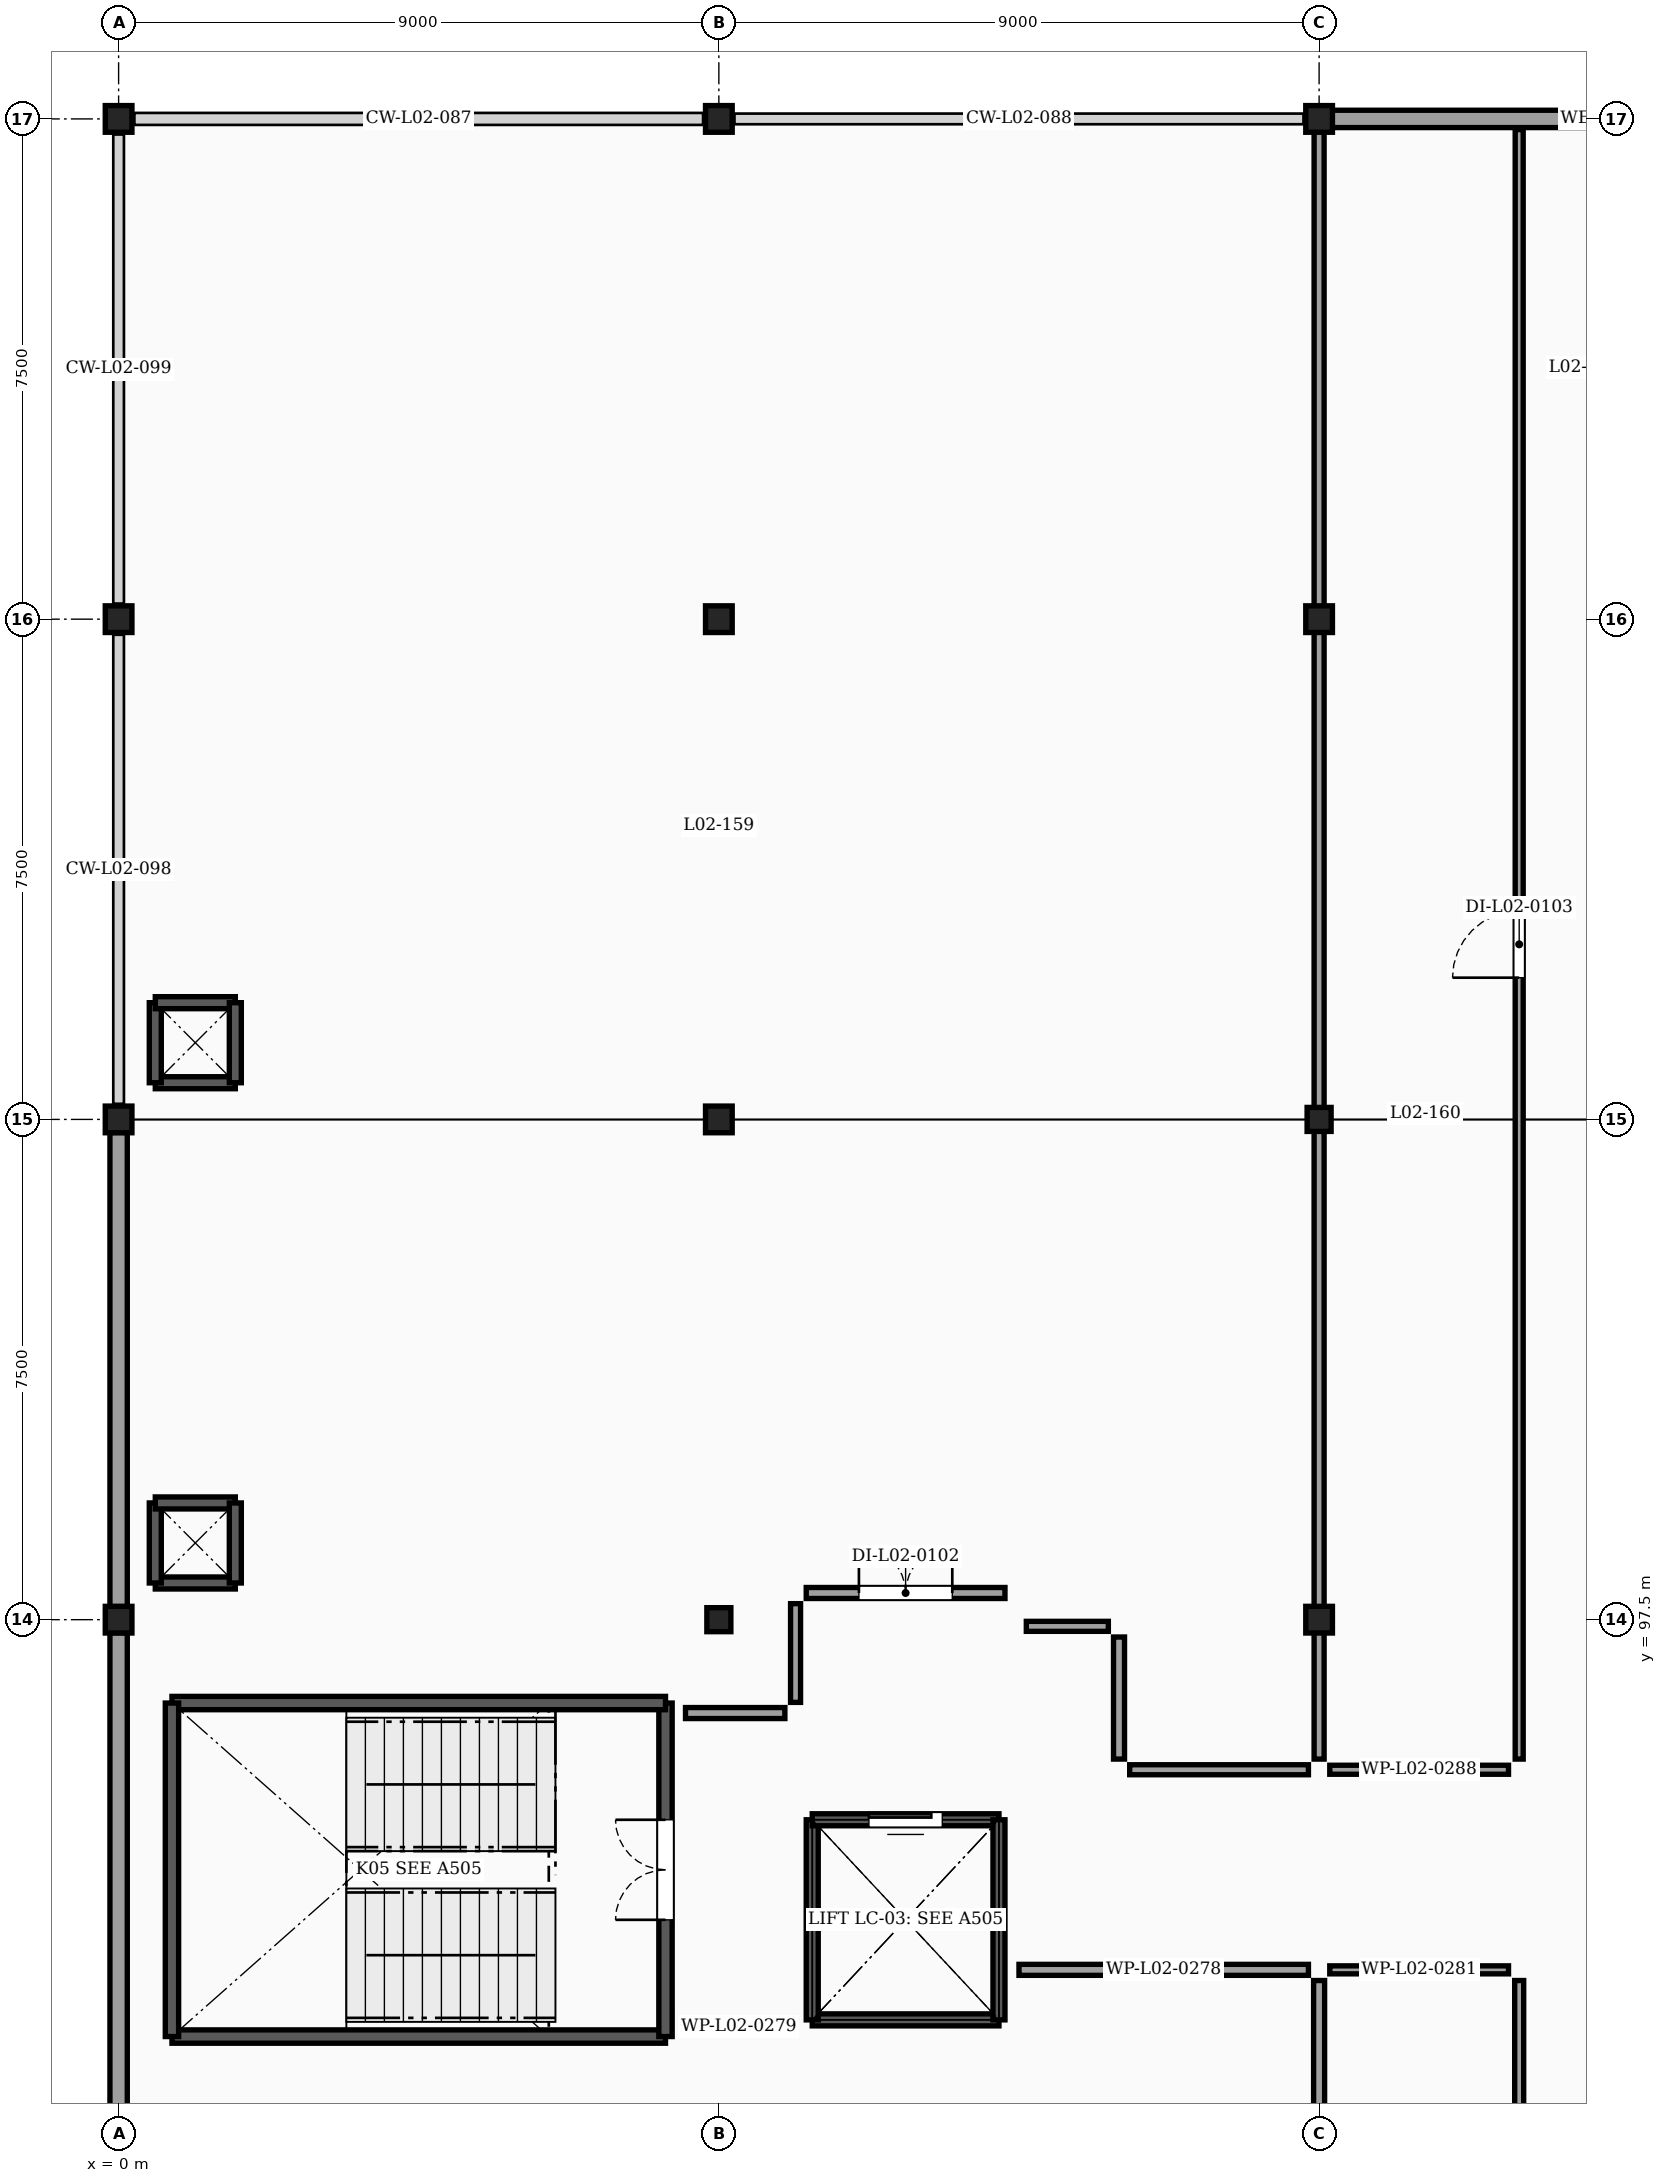
"""IFC4 building model, lengths in metres.
Left out: names, types, materials, properties, quantities, classifications, styles, units other than length and angle.
Written with IfcOpenShell. Run it as: python <this file> out.ifc"""

import sys

from ifc_helpers import new_model, si_unit, direction, frame, frame_2d, origin, origin_2d, place, context, subcontext, project, spatial, rectangle, extrude, element, fill, save


model = new_model("IFC4")
c1 = context("Model", 3, precision=1e-05, world=origin(), true_north=direction((0.0, 1.0)))
c2 = subcontext(c1, "Body", "Model", "MODEL_VIEW")
j1 = project(units=[si_unit("LENGTHUNIT", "METRE"), si_unit("PLANEANGLEUNIT", "RADIAN")], contexts=[c1])
p1 = place(None, origin())
s1 = spatial("IfcSite", under=j1, at=p1, CompositionType="ELEMENT")
p2 = place(p1, origin())
s2 = spatial("IfcBuilding", under=s1, at=p2, CompositionType="ELEMENT")
p3 = place(p2, frame((0.0, 0.0, 8.5)))
s3 = spatial("IfcBuildingStorey", under=s2, at=p3, CompositionType="ELEMENT", Elevation=8.5)
p4 = place(p3, frame((0.0, 97.5, 0.0), z_axis=(0.0, 0.0, 1.0), x_axis=(1.0, 0.0, 0.0)))
e1 = element("IfcColumn", 1, at=p4, inside=s3, PredefinedType="COLUMN", context=c2, shape_type="SweptSolid", body=[
    extrude(rectangle(XDim=0.4, YDim=0.4, at=origin_2d()), origin(), (0.0, 0.0, 1.0), 3.8),
])
p5 = place(p3, frame((9.0, 97.5, 0.0), z_axis=(0.0, 0.0, 1.0), x_axis=(1.0, 0.0, 0.0)))
e2 = element("IfcColumn", 2, at=p5, inside=s3, PredefinedType="COLUMN", context=c2, shape_type="SweptSolid", body=[
    extrude(rectangle(XDim=0.36, YDim=0.36, at=origin_2d()), origin(), (0.0, 0.0, 1.0), 3.8),
])
for number, where, z_axis, x_axis in (
    (3, (18.0, 97.5, 0.0), (0.0, 0.0, 1.0), (1.0, 0.0, 0.0)),
    (4, (0.0, 105.0, 0.0), (0.0, 0.0, 1.0), (1.0, 0.0, 0.0)),
    (5, (9.0, 105.0, 0.0), (0.0, 0.0, 1.0), (1.0, 0.0, 0.0)),
):
    element("IfcColumn", number, at=place(p3, frame(where, z_axis=z_axis, x_axis=x_axis)), inside=s3, PredefinedType="COLUMN", context=c2, shape_type="SweptSolid", body=[
        extrude(rectangle(XDim=0.4, YDim=0.4, at=origin_2d()), origin(), (0.0, 0.0, 1.0), 3.8),
    ])
p6 = place(p3, frame((18.0, 105.0, 0.0), z_axis=(0.0, 0.0, 1.0), x_axis=(1.0, 0.0, 0.0)))
e6 = element("IfcColumn", 6, at=p6, inside=s3, PredefinedType="COLUMN", context=c2, shape_type="SweptSolid", body=[
    extrude(rectangle(XDim=0.36, YDim=0.36, at=origin_2d()), origin(), (0.0, 0.0, 1.0), 3.8),
])
for number, where, z_axis, x_axis in (
    (7, (0.0, 112.5, 0.0), (0.0, 0.0, 1.0), (1.0, 0.0, 0.0)),
    (8, (9.0, 112.5, 0.0), (0.0, 0.0, 1.0), (1.0, 0.0, 0.0)),
    (9, (18.0, 112.5, 0.0), (0.0, 0.0, 1.0), (1.0, 0.0, 0.0)),
    (10, (0.0, 120.0, 0.0), (0.0, 0.0, 1.0), (1.0, 0.0, 0.0)),
    (11, (9.0, 120.0, 0.0), (0.0, 0.0, 1.0), (1.0, 0.0, 0.0)),
    (12, (18.0, 120.0, 0.0), (0.0, 0.0, 1.0), (1.0, 0.0, 0.0)),
):
    element("IfcColumn", number, at=place(p3, frame(where, z_axis=z_axis, x_axis=x_axis)), inside=s3, PredefinedType="COLUMN", context=c2, shape_type="SweptSolid", body=[
        extrude(rectangle(XDim=0.4, YDim=0.4, at=origin_2d()), origin(), (0.0, 0.0, 1.0), 3.8),
    ])
p7 = place(p3, frame((18.196, 120.0, 0.0), z_axis=(0.0, 0.0, 1.0), x_axis=(1.0, 0.0, 0.0)))
e13 = element("IfcWall", 13, at=p7, inside=s3, PredefinedType="SOLIDWALL", context=c2, shape_type="SweptSolid", body=[
    extrude(rectangle(XDim=8.608, YDim=0.26, at=frame_2d((4.304, 0.0))), origin(), (0.0, 0.0, 1.0), 2.987),
])
for number, where, z_axis, x_axis in (
    (14, (0.0, 90.196, 0.0), (0.0, 0.0, 1.0), (0.0, 1.0, 0.0)),
    (15, (0.0, 97.696, 0.0), (0.0, 0.0, 1.0), (0.0, 1.0, 0.0)),
):
    element("IfcWall", number, at=place(p3, frame(where, z_axis=z_axis, x_axis=x_axis)), inside=s3, PredefinedType="SOLIDWALL", context=c2, shape_type="SweptSolid", body=[
        extrude(rectangle(XDim=7.108, YDim=0.26, at=frame_2d((3.554, 0.0))), origin(), (0.0, 0.0, 1.0), 2.987),
    ])
for number, where, z_axis, x_axis in (
    (16, (1.75, 98.05, 0.0), (0.0, 0.0, 1.0), (-1.0, 0.0, 0.0)),
    (17, (0.55, 98.05, 0.0), (0.0, 0.0, 1.0), (0.0, 1.0, 0.0)),
    (18, (0.55, 99.25, 0.0), (0.0, 0.0, 1.0), (1.0, 0.0, 0.0)),
    (19, (1.75, 99.25, 0.0), (0.0, 0.0, 1.0), (0.0, -1.0, 0.0)),
    (20, (1.75, 105.55, 0.0), (0.0, 0.0, 1.0), (-1.0, 0.0, 0.0)),
    (21, (0.55, 105.55, 0.0), (0.0, 0.0, 1.0), (0.0, 1.0, 0.0)),
    (22, (0.55, 106.75, 0.0), (0.0, 0.0, 1.0), (1.0, 0.0, 0.0)),
    (23, (1.75, 106.75, 0.0), (0.0, 0.0, 1.0), (0.0, -1.0, 0.0)),
):
    element("IfcWall", number, at=place(p3, frame(where, z_axis=z_axis, x_axis=x_axis)), inside=s3, PredefinedType="SHEAR", context=c2, shape_type="SweptSolid", body=[
        extrude(rectangle(XDim=1.2, YDim=0.18, at=frame_2d((0.6, 0.0))), origin(), (0.0, 0.0, 1.0), 3.58),
    ])
p8 = place(p3, frame((0.8, 91.25, 0.0), z_axis=(0.0, 0.0, 1.0), x_axis=(1.0, 0.0, 0.0)))
e24 = element("IfcWall", 24, at=p8, inside=s3, PredefinedType="SHEAR", context=c2, shape_type="SweptSolid", body=[
    extrude(rectangle(XDim=7.4, YDim=0.2, at=frame_2d((3.7, 0.0))), origin(), (0.0, 0.0, 1.0), 3.58),
])
p9 = place(p3, frame((8.2, 91.25, 0.0), z_axis=(0.0, 0.0, 1.0), x_axis=(0.0, 1.0, 0.0)))
e25 = element("IfcWall", 25, at=p9, inside=s3, PredefinedType="SHEAR", context=c2, shape_type="SweptSolid", body=[
    extrude(rectangle(XDim=5.0, YDim=0.2, at=frame_2d((2.5, 0.0))), origin(), (0.0, 0.0, 1.0), 3.58),
])
p10 = place(p9, frame((1.75, 0.0, 0.0)))
e26 = element("IfcOpeningElement", 26, at=p10, cuts=e25, PredefinedType="OPENING", context=c2, shape_type="SweptSolid", body=[
    extrude(rectangle(XDim=1.5, YDim=2.15, at=frame_2d((0.75, 1.075))), frame((0.0, 0.11, 0.0), z_axis=(0.0, -1.0, 0.0), x_axis=(1.0, 0.0, 0.0)), (0.0, 0.0, 1.0), 0.22),
])
p11 = place(p3, frame((8.2, 96.25, 0.0), z_axis=(0.0, 0.0, 1.0), x_axis=(-1.0, 0.0, 0.0)))
e27 = element("IfcWall", 27, at=p11, inside=s3, PredefinedType="SHEAR", context=c2, shape_type="SweptSolid", body=[
    extrude(rectangle(XDim=7.4, YDim=0.2, at=frame_2d((3.7, 0.0))), origin(), (0.0, 0.0, 1.0), 3.58),
])
p12 = place(p3, frame((0.8, 96.25, 0.0), z_axis=(0.0, 0.0, 1.0), x_axis=(0.0, -1.0, 0.0)))
e28 = element("IfcWall", 28, at=p12, inside=s3, PredefinedType="SHEAR", context=c2, shape_type="SweptSolid", body=[
    extrude(rectangle(XDim=5.0, YDim=0.2, at=frame_2d((2.5, 0.0))), origin(), (0.0, 0.0, 1.0), 3.58),
])
p13 = place(p3, frame((13.2, 91.5, 0.0), z_axis=(0.0, 0.0, 1.0), x_axis=(-1.0, 0.0, 0.0)))
e29 = element("IfcWall", 29, at=p13, inside=s3, PredefinedType="SHEAR", context=c2, shape_type="SweptSolid", body=[
    extrude(rectangle(XDim=2.8, YDim=0.18, at=frame_2d((1.4, 0.0))), origin(), (0.0, 0.0, 1.0), 3.58),
])
p14 = place(p3, frame((10.4, 91.5, 0.0), z_axis=(0.0, 0.0, 1.0), x_axis=(0.0, 1.0, 0.0)))
e30 = element("IfcWall", 30, at=p14, inside=s3, PredefinedType="SHEAR", context=c2, shape_type="SweptSolid", body=[
    extrude(rectangle(XDim=3.0, YDim=0.18, at=frame_2d((1.5, 0.0))), origin(), (0.0, 0.0, 1.0), 3.58),
])
p15 = place(p3, frame((10.4, 94.5, 0.0), z_axis=(0.0, 0.0, 1.0), x_axis=(1.0, 0.0, 0.0)))
e31 = element("IfcWall", 31, at=p15, inside=s3, PredefinedType="SHEAR", context=c2, shape_type="SweptSolid", body=[
    extrude(rectangle(XDim=2.8, YDim=0.18, at=frame_2d((1.4, 0.0))), origin(), (0.0, 0.0, 1.0), 3.58),
])
p16 = place(p15, frame((0.85, 0.0, 0.0)))
e32 = element("IfcOpeningElement", 32, at=p16, cuts=e31, PredefinedType="OPENING", context=c2, shape_type="SweptSolid", body=[
    extrude(rectangle(XDim=1.1, YDim=2.15, at=frame_2d((0.55, 1.075))), frame((0.0, 0.1, 0.0), z_axis=(0.0, -1.0, 0.0), x_axis=(1.0, 0.0, 0.0)), (0.0, 0.0, 1.0), 0.2),
])
p17 = place(p3, frame((13.2, 94.5, 0.0), z_axis=(0.0, 0.0, 1.0), x_axis=(0.0, -1.0, 0.0)))
e33 = element("IfcWall", 33, at=p17, inside=s3, PredefinedType="SHEAR", context=c2, shape_type="SweptSolid", body=[
    extrude(rectangle(XDim=3.0, YDim=0.18, at=frame_2d((1.5, 0.0))), origin(), (0.0, 0.0, 1.0), 3.58),
])
p18 = place(p3, frame((17.84, 92.25, 0.0), z_axis=(0.0, 0.0, 1.0), x_axis=(-1.0, 0.0, 0.0)))
e34 = element("IfcWall", 34, at=p18, inside=s3, PredefinedType="PARTITIONING", context=c2, shape_type="SweptSolid", body=[
    extrude(rectangle(XDim=4.34, YDim=0.165, at=frame_2d((2.17, 0.0))), origin(), (0.0, 0.0, 1.0), 3.58),
])
p19 = place(p3, frame((10.1, 91.4, 0.0), z_axis=(0.0, 0.0, 1.0), x_axis=(-1.0, 0.0, 0.0)))
e35 = element("IfcWall", 35, at=p19, inside=s3, PredefinedType="PARTITIONING", context=c2, shape_type="SweptSolid", body=[
    extrude(rectangle(XDim=1.6, YDim=0.15, at=frame_2d((0.8, 0.0))), origin(), (0.0, 0.0, 1.0), 3.58),
])
p20 = place(p3, frame((21.0, 82.66, 0.0), z_axis=(0.0, 0.0, 1.0), x_axis=(0.0, 1.0, 0.0)))
e36 = element("IfcWall", 36, at=p20, inside=s3, PredefinedType="PARTITIONING", context=c2, shape_type="SweptSolid", body=[
    extrude(rectangle(XDim=9.43, YDim=0.135, at=frame_2d((4.715, 0.0))), origin(), (0.0, 0.0, 1.0), 3.172),
])
p21 = place(p20, frame((4.215, 0.0, 0.0)))
e37 = element("IfcOpeningElement", 37, at=p21, cuts=e36, PredefinedType="OPENING", context=c2, shape_type="SweptSolid", body=[
    extrude(rectangle(XDim=1.0, YDim=2.15, at=frame_2d((0.5, 1.075))), frame((0.0, 0.077, 0.0), z_axis=(0.0, -1.0, 0.0), x_axis=(1.0, 0.0, 0.0)), (0.0, 0.0, 1.0), 0.155),
])
p22 = place(p3, frame((20.84, 92.25, 0.0), z_axis=(0.0, 0.0, 1.0), x_axis=(-1.0, 0.0, 0.0)))
e38 = element("IfcWall", 38, at=p22, inside=s3, PredefinedType="PARTITIONING", context=c2, shape_type="SweptSolid", body=[
    extrude(rectangle(XDim=2.68, YDim=0.12, at=frame_2d((1.34, 0.0))), origin(), (0.0, 0.0, 1.0), 3.58),
])
p23 = place(p3, frame((15.0, 97.24, 0.0), z_axis=(0.0, 0.0, 1.0), x_axis=(0.0, -1.0, 0.0)))
e39 = element("IfcWall", 39, at=p23, inside=s3, PredefinedType="PARTITIONING", context=c2, shape_type="SweptSolid", body=[
    extrude(rectangle(XDim=1.83, YDim=0.165, at=frame_2d((0.915, 0.0))), origin(), (0.0, 0.0, 1.0), 3.172),
])
p24 = place(p3, frame((15.16, 95.25, 0.0), z_axis=(0.0, 0.0, 1.0), x_axis=(1.0, 0.0, 0.0)))
e40 = element("IfcWall", 40, at=p24, inside=s3, PredefinedType="PARTITIONING", context=c2, shape_type="SweptSolid", body=[
    extrude(rectangle(XDim=2.68, YDim=0.15, at=frame_2d((1.34, 0.0))), origin(), (0.0, 0.0, 1.0), 3.58),
])
p25 = place(p3, frame((8.5, 96.1, 0.0), z_axis=(0.0, 0.0, 1.0), x_axis=(1.0, 0.0, 0.0)))
e41 = element("IfcWall", 41, at=p25, inside=s3, PredefinedType="PARTITIONING", context=c2, shape_type="SweptSolid", body=[
    extrude(rectangle(XDim=1.49, YDim=0.165, at=frame_2d((0.745, 0.0))), origin(), (0.0, 0.0, 1.0), 3.58),
])
p26 = place(p3, frame((10.15, 96.26, 0.0), z_axis=(0.0, 0.0, 1.0), x_axis=(0.0, 1.0, 0.0)))
e42 = element("IfcWall", 42, at=p26, inside=s3, PredefinedType="PARTITIONING", context=c2, shape_type="SweptSolid", body=[
    extrude(rectangle(XDim=1.48, YDim=0.15, at=frame_2d((0.74, 0.0))), origin(), (0.0, 0.0, 1.0), 3.58),
])
p27 = place(p3, frame((10.31, 97.9, 0.0), z_axis=(0.0, 0.0, 1.0), x_axis=(1.0, 0.0, 0.0)))
e43 = element("IfcWall", 43, at=p27, inside=s3, PredefinedType="PARTITIONING", context=c2, shape_type="SweptSolid", body=[
    extrude(rectangle(XDim=2.98, YDim=0.165, at=frame_2d((1.49, 0.0))), origin(), (0.0, 0.0, 1.0), 3.58),
])
p28 = place(p27, frame((0.79, 0.0, 0.0)))
e44 = element("IfcOpeningElement", 44, at=p28, cuts=e43, PredefinedType="OPENING", context=c2, shape_type="SweptSolid", body=[
    extrude(rectangle(XDim=1.4, YDim=2.15, at=frame_2d((0.7, 1.075))), frame((0.0, 0.093, 0.0), z_axis=(0.0, -1.0, 0.0), x_axis=(1.0, 0.0, 0.0)), (0.0, 0.0, 1.0), 0.185),
])
p29 = place(p3, frame((13.61, 97.4, 0.0), z_axis=(0.0, 0.0, 1.0), x_axis=(1.0, 0.0, 0.0)))
e45 = element("IfcWall", 45, at=p29, inside=s3, PredefinedType="PARTITIONING", context=c2, shape_type="SweptSolid", body=[
    extrude(rectangle(XDim=1.23, YDim=0.15, at=frame_2d((0.615, 0.0))), origin(), (0.0, 0.0, 1.0), 2.88),
])
p30 = place(p3, frame((18.16, 95.25, 0.0), z_axis=(0.0, 0.0, 1.0), x_axis=(1.0, 0.0, 0.0)))
e46 = element("IfcWall", 46, at=p30, inside=s3, PredefinedType="PARTITIONING", context=c2, shape_type="SweptSolid", body=[
    extrude(rectangle(XDim=2.68, YDim=0.135, at=frame_2d((1.34, 0.0))), origin(), (0.0, 0.0, 1.0), 3.58),
])
p31 = place(p3, frame((21.0, 95.41, 0.0), z_axis=(0.0, 0.0, 1.0), x_axis=(0.0, 1.0, 0.0)))
e47 = element("IfcWall", 47, at=p31, inside=s3, PredefinedType="PARTITIONING", context=c2, shape_type="SweptSolid", body=[
    extrude(rectangle(XDim=24.43, YDim=0.12, at=frame_2d((12.215, 0.0))), origin(), (0.0, 0.0, 1.0), 3.172),
])
p32 = place(p31, frame((11.715, 0.0, 0.0)))
e48 = element("IfcOpeningElement", 48, at=p32, cuts=e47, PredefinedType="OPENING", context=c2, shape_type="SweptSolid", body=[
    extrude(rectangle(XDim=1.0, YDim=2.15, at=frame_2d((0.5, 1.075))), frame((0.0, 0.07, 0.0), z_axis=(0.0, -1.0, 0.0), x_axis=(1.0, 0.0, 0.0)), (0.0, 0.0, 1.0), 0.14),
])
p33 = place(p3, frame((18.0, 82.66, 0.0), z_axis=(0.0, 0.0, 1.0), x_axis=(0.0, 1.0, 0.0)))
e49 = element("IfcWall", 49, at=p33, inside=s3, PredefinedType="PARTITIONING", context=c2, shape_type="SweptSolid", body=[
    extrude(rectangle(XDim=9.43, YDim=0.165, at=frame_2d((4.715, 0.0))), origin(), (0.0, 0.0, 1.0), 2.88),
])
p34 = place(p33, frame((4.015, 0.0, 0.0)))
e50 = element("IfcOpeningElement", 50, at=p34, cuts=e49, PredefinedType="OPENING", context=c2, shape_type="SweptSolid", body=[
    extrude(rectangle(XDim=1.4, YDim=2.15, at=frame_2d((0.7, 1.075))), frame((0.0, 0.093, 0.0), z_axis=(0.0, -1.0, 0.0), x_axis=(1.0, 0.0, 0.0)), (0.0, 0.0, 1.0), 0.185),
])
p35 = place(p3, frame((18.0, 95.41, 0.0), z_axis=(0.0, 0.0, 1.0), x_axis=(0.0, 1.0, 0.0)))
e51 = element("IfcWall", 51, at=p35, inside=s3, PredefinedType="PARTITIONING", context=c2, shape_type="SweptSolid", body=[
    extrude(rectangle(XDim=24.43, YDim=0.15, at=frame_2d((12.215, 0.0))), origin(), (0.0, 0.0, 1.0), 2.88),
])
p36 = place(p10, origin())
e52 = element("IfcDoor", 52, at=p36, inside=s3, OperationType="DOUBLE_DOOR_SINGLE_SWING", PredefinedType="DOOR", context=c2, shape_type="SweptSolid", body=[
    extrude(rectangle(XDim=1.5, YDim=2.15, at=frame_2d((0.75, 1.075))), frame((0.0, 0.025, 0.0), z_axis=(0.0, -1.0, 0.0), x_axis=(1.0, 0.0, 0.0)), (0.0, 0.0, 1.0), 0.05),
])
fill(e26, e52)
p37 = place(p16, origin())
e53 = element("IfcDoor", 53, at=p37, inside=s3, OperationType="SLIDING_TO_LEFT", PredefinedType="DOOR", context=c2, shape_type="SweptSolid", body=[
    extrude(rectangle(XDim=1.1, YDim=2.15, at=frame_2d((0.55, 1.075))), frame((0.0, 0.025, 0.0), z_axis=(0.0, -1.0, 0.0), x_axis=(1.0, 0.0, 0.0)), (0.0, 0.0, 1.0), 0.05),
])
fill(e32, e53)
p38 = place(p28, origin())
e54 = element("IfcDoor", 54, at=p38, inside=s3, OperationType="DOUBLE_DOOR_SINGLE_SWING", PredefinedType="DOOR", context=c2, shape_type="SweptSolid", body=[
    extrude(rectangle(XDim=1.4, YDim=2.15, at=frame_2d((0.7, 1.075))), frame((0.0, 0.025, 0.0), z_axis=(0.0, -1.0, 0.0), x_axis=(1.0, 0.0, 0.0)), (0.0, 0.0, 1.0), 0.05),
])
fill(e44, e54)
p39 = place(p32, origin())
e55 = element("IfcDoor", 55, at=p39, inside=s3, OperationType="SINGLE_SWING_LEFT", PredefinedType="DOOR", context=c2, shape_type="SweptSolid", body=[
    extrude(rectangle(XDim=1.0, YDim=2.15, at=frame_2d((0.5, 1.075))), frame((0.0, 0.025, 0.0), z_axis=(0.0, -1.0, 0.0), x_axis=(1.0, 0.0, 0.0)), (0.0, 0.0, 1.0), 0.05),
])
fill(e48, e55)
save(model, sys.argv[1])
